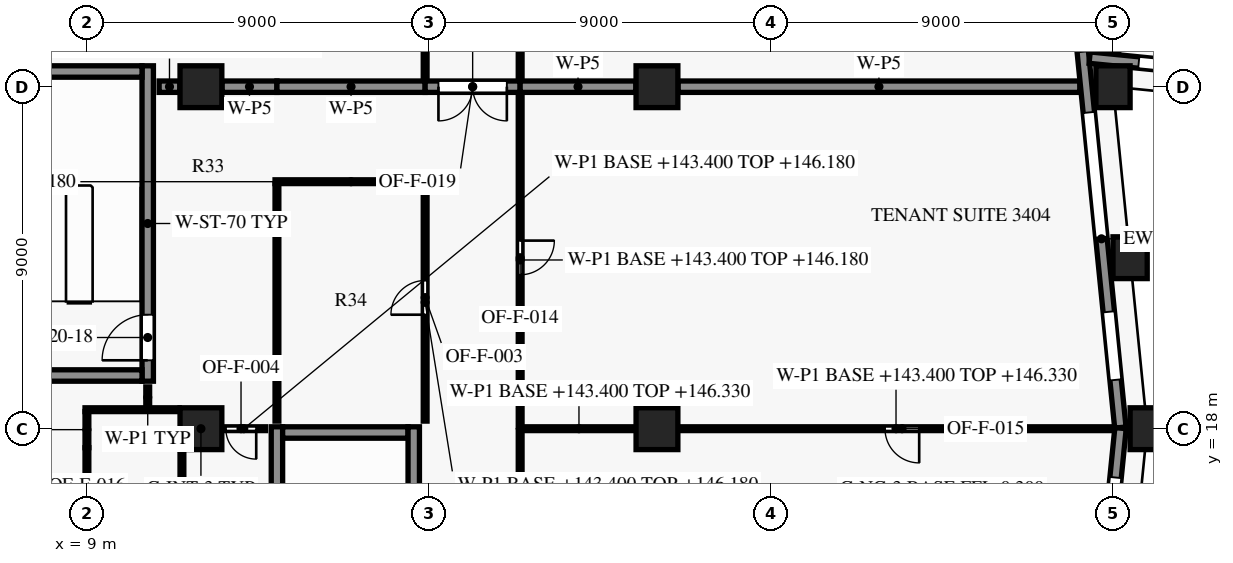
"""IFC4 building model, lengths in metres.
Left out: names, types, materials, properties, quantities, classifications, styles, units other than length and angle.
Written with IfcOpenShell. Run it as: python <this file> out.ifc"""

import sys

from ifc_helpers import new_model, si_unit, direction, frame, frame_2d, origin, origin_2d, place, context, subcontext, project, spatial, rectangle, extrude, element, fill, save


model = new_model("IFC4")
c1 = context("Model", 3, precision=1e-05, world=origin(), true_north=direction((0.0, 1.0)))
c2 = subcontext(c1, "Body", "Model", "MODEL_VIEW")
j1 = project(units=[si_unit("LENGTHUNIT", "METRE"), si_unit("PLANEANGLEUNIT", "RADIAN")], contexts=[c1])
p1 = place(None, origin())
s1 = spatial("IfcSite", under=j1, at=p1, CompositionType="ELEMENT")
p2 = place(p1, origin())
s2 = spatial("IfcBuilding", under=s1, at=p2, CompositionType="ELEMENT")
p3 = place(p2, frame((0.0, 0.0, 143.4)))
s3 = spatial("IfcBuildingStorey", under=s2, at=p3, CompositionType="ELEMENT", Elevation=143.4)
for number, where, z_axis, x_axis in (
    (1, (36.9, 18.0, 0.0), (0.0, 0.0, 1.0), (0.0, 1.0, 0.0)),
    (2, (36.45, 22.5, 0.0), (0.0, 0.0, 1.0), (-0.1, 0.995, 0.0)),
    (3, (36.0, 27.0, 0.0), (0.0, 0.0, 1.0), (-0.1, 0.995, 0.0)),
):
    element("IfcColumn", number, at=place(p3, frame(where, z_axis=z_axis, x_axis=x_axis)), inside=s3, PredefinedType="COLUMN", context=c2, shape_type="SweptSolid", body=[
        extrude(rectangle(XDim=0.9, YDim=1.1, at=origin_2d()), origin(), (0.0, 0.0, 1.0), 3.8),
    ])
for number, where, z_axis, x_axis in (
    (4, (12.0, 18.0, 0.0), (0.0, 0.0, 1.0), (1.0, 0.0, 0.0)),
    (5, (12.0, 27.0, 0.0), (0.0, 0.0, 1.0), (1.0, 0.0, 0.0)),
    (6, (24.0, 18.0, 0.0), (0.0, 0.0, 1.0), (1.0, 0.0, 0.0)),
    (7, (24.0, 27.0, 0.0), (0.0, 0.0, 1.0), (1.0, 0.0, 0.0)),
):
    element("IfcColumn", number, at=place(p3, frame(where, z_axis=z_axis, x_axis=x_axis)), inside=s3, PredefinedType="COLUMN", context=c2, shape_type="SweptSolid", body=[
        extrude(rectangle(XDim=1.1, YDim=1.1, at=origin_2d()), origin(), (0.0, 0.0, 1.0), 3.8),
    ])
p4 = place(p3, frame((36.198, 18.015, 0.0), z_axis=(0.0, 0.0, 1.0), x_axis=(-0.099529980022, -0.99503456376, 0.0)))
e8 = element("IfcWall", 8, at=p4, inside=s3, PredefinedType="SOLIDWALL", context=c2, shape_type="SweptSolid", body=[
    extrude(rectangle(XDim=3.682, YDim=0.3, at=frame_2d((1.841, 0.0))), origin(), (0.0, 0.0, 1.0), 3.15),
])
p5 = place(p4, frame((1.306, 0.0, 0.75)))
e9 = element("IfcOpeningElement", 9, at=p5, cuts=e8, PredefinedType="OPENING", context=c2, shape_type="SweptSolid", body=[
    extrude(rectangle(XDim=1.8, YDim=1.8, at=frame_2d((0.9, 0.9))), frame((0.0, 0.16, 0.0), z_axis=(0.0, -1.0, 0.0), x_axis=(1.0, 0.0, 0.0)), (0.0, 0.0, 1.0), 0.32),
])
p6 = place(p3, frame((35.2, 27.964, 0.0), z_axis=(0.0, 0.0, 1.0), x_axis=(0.099501297882, -0.995037432321, 0.0)))
e10 = element("IfcWall", 10, at=p6, inside=s3, PredefinedType="SOLIDWALL", context=c2, shape_type="SweptSolid", body=[
    extrude(rectangle(XDim=9.984, YDim=0.3, at=frame_2d((4.992, 0.0))), origin(), (0.0, 0.0, 1.0), 3.15),
])
p7 = place(p6, frame((1.65, 0.0, 0.15)))
e11 = element("IfcOpeningElement", 11, at=p7, cuts=e10, PredefinedType="OPENING", context=c2, shape_type="SweptSolid", body=[
    extrude(rectangle(XDim=3.3, YDim=2.4, at=frame_2d((1.65, 1.2))), frame((0.0, 0.16, 0.0), z_axis=(0.0, -1.0, 0.0), x_axis=(1.0, 0.0, 0.0)), (0.0, 0.0, 1.0), 0.32),
])
p8 = place(p6, frame((6.923, 0.0, 0.75)))
e12 = element("IfcOpeningElement", 12, at=p8, cuts=e10, PredefinedType="OPENING", context=c2, shape_type="SweptSolid", body=[
    extrude(rectangle(XDim=1.8, YDim=1.8, at=frame_2d((0.9, 0.9))), frame((0.0, 0.16, 0.0), z_axis=(0.0, -1.0, 0.0), x_axis=(1.0, 0.0, 0.0)), (0.0, 0.0, 1.0), 0.32),
])
p9 = place(p3, frame((45.015, 26.802, 0.0), z_axis=(0.0, 0.0, 1.0), x_axis=(-0.995037689759, 0.099498723402, 0.0)))
e13 = element("IfcWall", 13, at=p9, inside=s3, PredefinedType="SOLIDWALL", context=c2, shape_type="SweptSolid", body=[
    extrude(rectangle(XDim=9.677, YDim=0.3, at=frame_2d((4.839, 0.0))), origin(), (0.0, 0.0, 1.0), 3.15),
])
p10 = place(p9, frame((1.306, 0.0, 0.75)))
e14 = element("IfcOpeningElement", 14, at=p10, cuts=e13, PredefinedType="OPENING", context=c2, shape_type="SweptSolid", body=[
    extrude(rectangle(XDim=1.8, YDim=1.8, at=frame_2d((0.9, 0.9))), frame((0.0, 0.16, 0.0), z_axis=(0.0, -1.0, 0.0), x_axis=(1.0, 0.0, 0.0)), (0.0, 0.0, 1.0), 0.32),
])
p11 = place(p9, frame((5.079, 0.0, 0.15)))
e15 = element("IfcOpeningElement", 15, at=p11, cuts=e13, PredefinedType="OPENING", context=c2, shape_type="SweptSolid", body=[
    extrude(rectangle(XDim=3.3, YDim=2.4, at=frame_2d((1.65, 1.2))), frame((0.0, 0.16, 0.0), z_axis=(0.0, -1.0, 0.0), x_axis=(1.0, 0.0, 0.0)), (0.0, 0.0, 1.0), 0.32),
])
for number, where, z_axis, x_axis in (
    (16, (14.15, 17.9, 0.0), (0.0, 0.0, 1.0), (1.0, 0.0, 0.0)),
    (17, (7.15, 19.4, 0.0), (0.0, 0.0, 1.0), (1.0, 0.0, 0.0)),
    (18, (7.15, 27.4, 0.0), (0.0, 0.0, 1.0), (1.0, 0.0, 0.0)),
):
    element("IfcWall", number, at=place(p3, frame(where, z_axis=z_axis, x_axis=x_axis)), inside=s3, PredefinedType="SHEAR", context=c2, shape_type="SweptSolid", body=[
        extrude(rectangle(XDim=3.3, YDim=0.3, at=frame_2d((1.65, 0.0))), origin(), (0.0, 0.0, 1.0), 3.5),
    ])
p12 = place(p3, frame((10.6, 19.25, 0.0), z_axis=(0.0, 0.0, 1.0), x_axis=(0.0, 1.0, 0.0)))
e19 = element("IfcWall", 19, at=p12, inside=s3, PredefinedType="SHEAR", context=c2, shape_type="SweptSolid", body=[
    extrude(rectangle(XDim=8.3, YDim=0.3, at=frame_2d((4.15, 0.0))), origin(), (0.0, 0.0, 1.0), 3.5),
])
p13 = place(p12, frame((0.55, 0.0, 0.0)))
e20 = element("IfcOpeningElement", 20, at=p13, cuts=e19, PredefinedType="OPENING", context=c2, shape_type="SweptSolid", body=[
    extrude(rectangle(XDim=1.2, YDim=2.2, at=frame_2d((0.6, 1.1))), frame((0.0, 0.16, 0.0), z_axis=(0.0, -1.0, 0.0), x_axis=(1.0, 0.0, 0.0)), (0.0, 0.0, 1.0), 0.32),
])
p14 = place(p3, frame((14.0, 9.75, 0.0), z_axis=(0.0, 0.0, 1.0), x_axis=(0.0, 1.0, 0.0)))
e21 = element("IfcWall", 21, at=p14, inside=s3, PredefinedType="SHEAR", context=c2, shape_type="SweptSolid", body=[
    extrude(rectangle(XDim=8.3, YDim=0.3, at=frame_2d((4.15, 0.0))), origin(), (0.0, 0.0, 1.0), 3.5),
])
p15 = place(p3, frame((17.6, 9.55, 0.0), z_axis=(0.0, 0.0, 1.0), x_axis=(0.0, 1.0, 0.0)))
e22 = element("IfcWall", 22, at=p15, inside=s3, PredefinedType="SHEAR", context=c2, shape_type="SweptSolid", body=[
    extrude(rectangle(XDim=8.5, YDim=0.3, at=frame_2d((4.25, 0.0))), origin(), (0.0, 0.0, 1.0), 3.5),
])
p16 = place(p15, frame((0.85, 0.0, 0.0)))
e23 = element("IfcOpeningElement", 23, at=p16, cuts=e22, PredefinedType="OPENING", context=c2, shape_type="SweptSolid", body=[
    extrude(rectangle(XDim=1.2, YDim=2.2, at=frame_2d((0.6, 1.1))), frame((0.0, 0.16, 0.0), z_axis=(0.0, -1.0, 0.0), x_axis=(1.0, 0.0, 0.0)), (0.0, 0.0, 1.0), 0.32),
])
p17 = place(p3, frame((9.0, 12.35, 0.0), z_axis=(0.0, 0.0, 1.0), x_axis=(0.0, 1.0, 0.0)))
e24 = element("IfcWall", 24, at=p17, inside=s3, PredefinedType="PARTITIONING", context=c2, shape_type="SweptSolid", body=[
    extrude(rectangle(XDim=5.15, YDim=0.1, at=frame_2d((2.575, 0.0))), origin(), (0.0, 0.0, 1.0), 3.48),
])
p18 = place(p17, frame((2.1, 0.0, 0.0)))
e25 = element("IfcOpeningElement", 25, at=p18, cuts=e24, PredefinedType="OPENING", context=c2, shape_type="SweptSolid", body=[
    extrude(rectangle(XDim=0.9, YDim=2.1, at=frame_2d((0.45, 1.05))), frame((0.0, 0.06, 0.0), z_axis=(0.0, -1.0, 0.0), x_axis=(1.0, 0.0, 0.0)), (0.0, 0.0, 1.0), 0.12),
])
p19 = place(p3, frame((11.5, 17.445, 0.0), z_axis=(0.0, 0.0, 1.0), x_axis=(0.0, -1.0, 0.0)))
e26 = element("IfcWall", 26, at=p19, inside=s3, PredefinedType="PARTITIONING", context=c2, shape_type="SweptSolid", body=[
    extrude(rectangle(XDim=5.095, YDim=0.1, at=frame_2d((2.547, 0.0))), origin(), (0.0, 0.0, 1.0), 3.48),
])
p20 = place(p3, frame((9.0, 17.5, 0.0), z_axis=(0.0, 0.0, 1.0), x_axis=(0.0, 1.0, 0.0)))
e27 = element("IfcWall", 27, at=p20, inside=s3, PredefinedType="PARTITIONING", context=c2, shape_type="SweptSolid", body=[
    extrude(rectangle(XDim=0.95, YDim=0.1, at=frame_2d((0.475, 0.0))), origin(), (0.0, 0.0, 1.0), 2.93),
])
p21 = place(p3, frame((20.4, 17.95, 0.0), z_axis=(0.0, 0.0, 1.0), x_axis=(0.0, -1.0, 0.0)))
e28 = element("IfcWall", 28, at=p21, inside=s3, PredefinedType="PARTITIONING", context=c2, shape_type="SweptSolid", body=[
    extrude(rectangle(XDim=5.6, YDim=0.1, at=frame_2d((2.8, 0.0))), origin(), (0.0, 0.0, 1.0), 2.93),
])
p22 = place(p3, frame((13.7, 18.0, 0.0), z_axis=(0.0, 0.0, 1.0), x_axis=(-1.0, 0.0, 0.0)))
e29 = element("IfcWall", 29, at=p22, inside=s3, PredefinedType="PARTITIONING", context=c2, shape_type="SweptSolid", body=[
    extrude(rectangle(XDim=1.145, YDim=0.1, at=frame_2d((0.573, 0.0))), origin(), (0.0, 0.0, 1.0), 2.78),
])
p23 = place(p22, frame((0.245, 0.0, 0.0)))
e30 = element("IfcOpeningElement", 30, at=p23, cuts=e29, PredefinedType="OPENING", context=c2, shape_type="SweptSolid", body=[
    extrude(rectangle(XDim=0.8, YDim=2.1, at=frame_2d((0.4, 1.05))), frame((0.0, 0.06, 0.0), z_axis=(0.0, -1.0, 0.0), x_axis=(1.0, 0.0, 0.0)), (0.0, 0.0, 1.0), 0.12),
])
p24 = place(p3, frame((23.445, 18.0, 0.0), z_axis=(0.0, 0.0, 1.0), x_axis=(-1.0, 0.0, 0.0)))
e31 = element("IfcWall", 31, at=p24, inside=s3, PredefinedType="PARTITIONING", context=c2, shape_type="SweptSolid", body=[
    extrude(rectangle(XDim=2.995, YDim=0.1, at=frame_2d((1.498, 0.0))), origin(), (0.0, 0.0, 1.0), 2.93),
])
p25 = place(p3, frame((36.026, 18.0, 0.0), z_axis=(0.0, 0.0, 1.0), x_axis=(-1.0, 0.0, 0.0)))
e32 = element("IfcWall", 32, at=p25, inside=s3, PredefinedType="PARTITIONING", context=c2, shape_type="SweptSolid", body=[
    extrude(rectangle(XDim=11.471, YDim=0.1, at=frame_2d((5.735, 0.0))), origin(), (0.0, 0.0, 1.0), 2.93),
])
p26 = place(p25, frame((5.126, 0.0, 0.0)))
e33 = element("IfcOpeningElement", 33, at=p26, cuts=e32, PredefinedType="OPENING", context=c2, shape_type="SweptSolid", body=[
    extrude(rectangle(XDim=0.9, YDim=2.1, at=frame_2d((0.45, 1.05))), frame((0.0, 0.06, 0.0), z_axis=(0.0, -1.0, 0.0), x_axis=(1.0, 0.0, 0.0)), (0.0, 0.0, 1.0), 0.12),
])
p27 = place(p3, frame((17.9, 18.2, 0.0), z_axis=(0.0, 0.0, 1.0), x_axis=(0.0, 1.0, 0.0)))
e34 = element("IfcWall", 34, at=p27, inside=s3, PredefinedType="PARTITIONING", context=c2, shape_type="SweptSolid", body=[
    extrude(rectangle(XDim=6.25, YDim=0.1, at=frame_2d((3.125, 0.0))), origin(), (0.0, 0.0, 1.0), 2.78),
])
p28 = place(p27, frame((2.8, 0.0, 0.0)))
e35 = element("IfcOpeningElement", 35, at=p28, cuts=e34, PredefinedType="OPENING", context=c2, shape_type="SweptSolid", body=[
    extrude(rectangle(XDim=0.9, YDim=2.1, at=frame_2d((0.45, 1.05))), frame((0.0, 0.06, 0.0), z_axis=(0.0, -1.0, 0.0), x_axis=(1.0, 0.0, 0.0)), (0.0, 0.0, 1.0), 0.12),
])
p29 = place(p3, frame((8.95, 18.5, 0.0), z_axis=(0.0, 0.0, 1.0), x_axis=(1.0, 0.0, 0.0)))
e36 = element("IfcWall", 36, at=p29, inside=s3, PredefinedType="PARTITIONING", context=c2, shape_type="SweptSolid", body=[
    extrude(rectangle(XDim=2.48, YDim=0.1, at=frame_2d((1.24, 0.0))), origin(), (0.0, 0.0, 1.0), 3.48),
])
p30 = place(p3, frame((10.6, 18.55, 0.0), z_axis=(0.0, 0.0, 1.0), x_axis=(0.0, 1.0, 0.0)))
e37 = element("IfcWall", 37, at=p30, inside=s3, PredefinedType="PARTITIONING", context=c2, shape_type="SweptSolid", body=[
    extrude(rectangle(XDim=0.55, YDim=0.1, at=frame_2d((0.275, 0.0))), origin(), (0.0, 0.0, 1.0), 3.48),
])
p31 = place(p3, frame((14.0, 24.45, 0.0), z_axis=(0.0, 0.0, 1.0), x_axis=(0.0, -1.0, 0.0)))
e38 = element("IfcWall", 38, at=p31, inside=s3, PredefinedType="PARTITIONING", context=c2, shape_type="SweptSolid", body=[
    extrude(rectangle(XDim=6.25, YDim=0.1, at=frame_2d((3.125, 0.0))), origin(), (0.0, 0.0, 1.0), 3.48),
])
p32 = place(p3, frame((17.95, 24.5, 0.0), z_axis=(0.0, 0.0, 1.0), x_axis=(-1.0, 0.0, 0.0)))
e39 = element("IfcWall", 39, at=p32, inside=s3, PredefinedType="PARTITIONING", context=c2, shape_type="SweptSolid", body=[
    extrude(rectangle(XDim=4.0, YDim=0.1, at=frame_2d((2.0, 0.0))), origin(), (0.0, 0.0, 1.0), 2.78),
])
p33 = place(p3, frame((20.4, 26.83, 0.0), z_axis=(0.0, 0.0, 1.0), x_axis=(0.0, -1.0, 0.0)))
e40 = element("IfcWall", 40, at=p33, inside=s3, PredefinedType="PARTITIONING", context=c2, shape_type="SweptSolid", body=[
    extrude(rectangle(XDim=8.78, YDim=0.1, at=frame_2d((4.39, 0.0))), origin(), (0.0, 0.0, 1.0), 2.78),
])
p34 = place(p33, frame((3.88, 0.0, 0.0)))
e41 = element("IfcOpeningElement", 41, at=p34, cuts=e40, PredefinedType="OPENING", context=c2, shape_type="SweptSolid", body=[
    extrude(rectangle(XDim=0.9, YDim=2.1, at=frame_2d((0.45, 1.05))), frame((0.0, 0.06, 0.0), z_axis=(0.0, -1.0, 0.0), x_axis=(1.0, 0.0, 0.0)), (0.0, 0.0, 1.0), 0.12),
])
p35 = place(p3, frame((10.9, 27.0, 0.0), z_axis=(0.0, 0.0, 1.0), x_axis=(1.0, 0.0, 0.0)))
e42 = element("IfcWall", 42, at=p35, inside=s3, PredefinedType="PARTITIONING", context=c2, shape_type="SweptSolid", body=[
    extrude(rectangle(XDim=0.545, YDim=0.3, at=frame_2d((0.272, 0.0))), origin(), (0.0, 0.0, 1.0), 3.48),
])
p36 = place(p3, frame((12.555, 27.0, 0.0), z_axis=(0.0, 0.0, 1.0), x_axis=(1.0, 0.0, 0.0)))
e43 = element("IfcWall", 43, at=p36, inside=s3, PredefinedType="PARTITIONING", context=c2, shape_type="SweptSolid", body=[
    extrude(rectangle(XDim=1.445, YDim=0.3, at=frame_2d((0.723, 0.0))), origin(), (0.0, 0.0, 1.0), 2.78),
])
p37 = place(p3, frame((14.0, 27.0, 0.0), z_axis=(0.0, 0.0, 1.0), x_axis=(1.0, 0.0, 0.0)))
e44 = element("IfcWall", 44, at=p37, inside=s3, PredefinedType="PARTITIONING", context=c2, shape_type="SweptSolid", body=[
    extrude(rectangle(XDim=3.9, YDim=0.3, at=frame_2d((1.95, 0.0))), origin(), (0.0, 0.0, 1.0), 2.78),
])
p38 = place(p3, frame((20.4, 27.0, 0.0), z_axis=(0.0, 0.0, 1.0), x_axis=(-1.0, 0.0, 0.0)))
e45 = element("IfcWall", 45, at=p38, inside=s3, PredefinedType="PARTITIONING", context=c2, shape_type="SweptSolid", body=[
    extrude(rectangle(XDim=2.5, YDim=0.3, at=frame_2d((1.25, 0.0))), origin(), (0.0, 0.0, 1.0), 2.78),
])
p39 = place(p38, frame((0.35, 0.0, 0.0)))
e46 = element("IfcOpeningElement", 46, at=p39, cuts=e45, PredefinedType="OPENING", context=c2, shape_type="SweptSolid", body=[
    extrude(rectangle(XDim=1.8, YDim=2.1, at=frame_2d((0.9, 1.05))), frame((0.0, 0.16, 0.0), z_axis=(0.0, -1.0, 0.0), x_axis=(1.0, 0.0, 0.0)), (0.0, 0.0, 1.0), 0.32),
])
p40 = place(p3, frame((20.4, 27.0, 0.0), z_axis=(0.0, 0.0, 1.0), x_axis=(1.0, 0.0, 0.0)))
e47 = element("IfcWall", 47, at=p40, inside=s3, PredefinedType="PARTITIONING", context=c2, shape_type="SweptSolid", body=[
    extrude(rectangle(XDim=3.045, YDim=0.3, at=frame_2d((1.522, 0.0))), origin(), (0.0, 0.0, 1.0), 2.78),
])
p41 = place(p3, frame((24.555, 27.0, 0.0), z_axis=(0.0, 0.0, 1.0), x_axis=(1.0, 0.0, 0.0)))
e48 = element("IfcWall", 48, at=p41, inside=s3, PredefinedType="PARTITIONING", context=c2, shape_type="SweptSolid", body=[
    extrude(rectangle(XDim=10.571, YDim=0.3, at=frame_2d((5.285, 0.0))), origin(), (0.0, 0.0, 1.0), 2.78),
])
p42 = place(p3, frame((17.9, 27.17, 0.0), z_axis=(0.0, 0.0, 1.0), x_axis=(0.0, 1.0, 0.0)))
e49 = element("IfcWall", 49, at=p42, inside=s3, PredefinedType="PARTITIONING", context=c2, shape_type="SweptSolid", body=[
    extrude(rectangle(XDim=6.28, YDim=0.1, at=frame_2d((3.14, 0.0))), origin(), (0.0, 0.0, 1.0), 2.78),
])
p43 = place(p3, frame((36.0, 27.874, 0.0), z_axis=(0.0, 0.0, 1.0), x_axis=(0.0, 1.0, 0.0)))
e50 = element("IfcWall", 50, at=p43, inside=s3, PredefinedType="PARTITIONING", context=c2, shape_type="SweptSolid", body=[
    extrude(rectangle(XDim=5.263, YDim=0.3, at=frame_2d((2.632, 0.0))), origin(), (0.0, 0.0, 1.0), 2.78),
])
p44 = place(p3, frame((20.4, 33.45, 0.0), z_axis=(0.0, 0.0, 1.0), x_axis=(0.0, -1.0, 0.0)))
e51 = element("IfcWall", 51, at=p44, inside=s3, PredefinedType="PARTITIONING", context=c2, shape_type="SweptSolid", body=[
    extrude(rectangle(XDim=6.28, YDim=0.1, at=frame_2d((3.14, 0.0))), origin(), (0.0, 0.0, 1.0), 2.78),
])
p45 = place(p5, origin())
e52 = element("IfcWindow", 52, at=p45, inside=s3, PartitioningType="SINGLE_PANEL", PredefinedType="WINDOW", context=c2, shape_type="SweptSolid", body=[
    extrude(rectangle(XDim=1.8, YDim=1.8, at=frame_2d((0.9, 0.9))), frame((0.0, 0.03, 0.0), z_axis=(0.0, -1.0, 0.0), x_axis=(1.0, 0.0, 0.0)), (0.0, 0.0, 1.0), 0.06),
])
fill(e9, e52)
p46 = place(p7, origin())
e53 = element("IfcWindow", 53, at=p46, inside=s3, PartitioningType="SINGLE_PANEL", PredefinedType="WINDOW", context=c2, shape_type="SweptSolid", body=[
    extrude(rectangle(XDim=3.3, YDim=2.4, at=frame_2d((1.65, 1.2))), frame((0.0, 0.03, 0.0), z_axis=(0.0, -1.0, 0.0), x_axis=(1.0, 0.0, 0.0)), (0.0, 0.0, 1.0), 0.06),
])
fill(e11, e53)
p47 = place(p8, origin())
e54 = element("IfcWindow", 54, at=p47, inside=s3, PartitioningType="SINGLE_PANEL", PredefinedType="WINDOW", context=c2, shape_type="SweptSolid", body=[
    extrude(rectangle(XDim=1.8, YDim=1.8, at=frame_2d((0.9, 0.9))), frame((0.0, 0.03, 0.0), z_axis=(0.0, -1.0, 0.0), x_axis=(1.0, 0.0, 0.0)), (0.0, 0.0, 1.0), 0.06),
])
fill(e12, e54)
p48 = place(p11, origin())
e55 = element("IfcWindow", 55, at=p48, inside=s3, PartitioningType="SINGLE_PANEL", PredefinedType="WINDOW", context=c2, shape_type="SweptSolid", body=[
    extrude(rectangle(XDim=3.3, YDim=2.4, at=frame_2d((1.65, 1.2))), frame((0.0, 0.03, 0.0), z_axis=(0.0, -1.0, 0.0), x_axis=(1.0, 0.0, 0.0)), (0.0, 0.0, 1.0), 0.06),
])
fill(e15, e55)
p49 = place(p13, origin())
e56 = element("IfcDoor", 56, at=p49, inside=s3, OperationType="SINGLE_SWING_RIGHT", PredefinedType="DOOR", context=c2, shape_type="SweptSolid", body=[
    extrude(rectangle(XDim=1.2, YDim=2.2, at=frame_2d((0.6, 1.1))), frame((0.0, 0.025, 0.0), z_axis=(0.0, -1.0, 0.0), x_axis=(1.0, 0.0, 0.0)), (0.0, 0.0, 1.0), 0.05),
])
fill(e20, e56)
p50 = place(p28, origin())
e57 = element("IfcDoor", 57, at=p50, inside=s3, OperationType="SINGLE_SWING_LEFT", PredefinedType="DOOR", context=c2, shape_type="SweptSolid", body=[
    extrude(rectangle(XDim=0.9, YDim=2.1, at=frame_2d((0.45, 1.05))), frame((0.0, 0.025, 0.0), z_axis=(0.0, -1.0, 0.0), x_axis=(1.0, 0.0, 0.0)), (0.0, 0.0, 1.0), 0.05),
])
fill(e35, e57)
p51 = place(p23, origin())
e58 = element("IfcDoor", 58, at=p51, inside=s3, OperationType="SINGLE_SWING_LEFT", PredefinedType="DOOR", context=c2, shape_type="SweptSolid", body=[
    extrude(rectangle(XDim=0.8, YDim=2.1, at=frame_2d((0.4, 1.05))), frame((0.0, 0.025, 0.0), z_axis=(0.0, -1.0, 0.0), x_axis=(1.0, 0.0, 0.0)), (0.0, 0.0, 1.0), 0.05),
])
fill(e30, e58)
p52 = place(p34, origin())
e59 = element("IfcDoor", 59, at=p52, inside=s3, OperationType="SINGLE_SWING_LEFT", PredefinedType="DOOR", context=c2, shape_type="SweptSolid", body=[
    extrude(rectangle(XDim=0.9, YDim=2.1, at=frame_2d((0.45, 1.05))), frame((0.0, 0.025, 0.0), z_axis=(0.0, -1.0, 0.0), x_axis=(1.0, 0.0, 0.0)), (0.0, 0.0, 1.0), 0.05),
])
fill(e41, e59)
p53 = place(p26, origin())
e60 = element("IfcDoor", 60, at=p53, inside=s3, OperationType="SINGLE_SWING_LEFT", PredefinedType="DOOR", context=c2, shape_type="SweptSolid", body=[
    extrude(rectangle(XDim=0.9, YDim=2.1, at=frame_2d((0.45, 1.05))), frame((0.0, 0.025, 0.0), z_axis=(0.0, -1.0, 0.0), x_axis=(1.0, 0.0, 0.0)), (0.0, 0.0, 1.0), 0.05),
])
fill(e33, e60)
p54 = place(p39, origin())
e61 = element("IfcDoor", 61, at=p54, inside=s3, OperationType="DOUBLE_DOOR_SINGLE_SWING", PredefinedType="DOOR", context=c2, shape_type="SweptSolid", body=[
    extrude(rectangle(XDim=1.8, YDim=2.1, at=frame_2d((0.9, 1.05))), frame((0.0, 0.025, 0.0), z_axis=(0.0, -1.0, 0.0), x_axis=(1.0, 0.0, 0.0)), (0.0, 0.0, 1.0), 0.05),
])
fill(e46, e61)
save(model, sys.argv[1])
